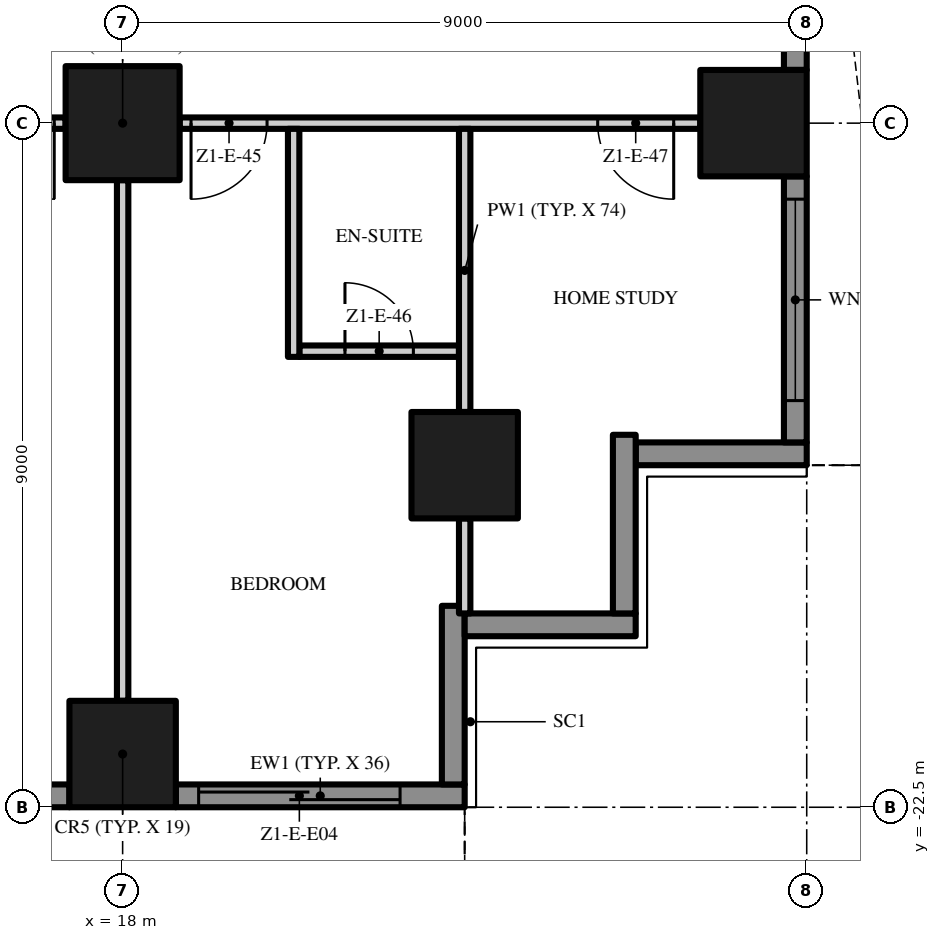
"""IFC4 building model, lengths in metres.
Left out: names, types, materials, properties, quantities, classifications, styles, units other than length and angle.
Written with IfcOpenShell. Run it as: python <this file> out.ifc"""

import sys

from ifc_helpers import new_model, si_unit, direction, frame, frame_2d, origin, origin_2d, place, context, subcontext, project, spatial, polyline, rectangle, outline, extrude, element, fill, save


model = new_model("IFC4")
c1 = context("Model", 3, precision=1e-05, world=origin(), true_north=direction((0.0, 1.0)))
c2 = subcontext(c1, "Body", "Model", "MODEL_VIEW")
j1 = project(units=[si_unit("LENGTHUNIT", "METRE"), si_unit("PLANEANGLEUNIT", "RADIAN")], contexts=[c1])
p1 = place(None, origin())
s1 = spatial("IfcSite", under=j1, at=p1, CompositionType="ELEMENT")
p2 = place(p1, origin())
s2 = spatial("IfcBuilding", under=s1, at=p2, CompositionType="ELEMENT")
p3 = place(p2, frame((0.0, 0.0, 56.8)))
s3 = spatial("IfcBuildingStorey", under=s2, at=p3, CompositionType="ELEMENT", Elevation=56.8)
p4 = place(p3, frame((18.0, -13.5, 0.0), z_axis=(0.0, 0.0, 1.0), x_axis=(1.0, 0.0, 0.0)))
e1 = element("IfcColumn", 1, at=p4, inside=s3, PredefinedType="COLUMN", context=c2, shape_type="SweptSolid", body=[
    extrude(rectangle(XDim=1.5, YDim=1.5, at=origin_2d()), origin(), (0.0, 0.0, 1.0), 3.5),
])
for number, where, z_axis, x_axis in (
    (2, (18.0, -21.8, 0.0), (0.0, 0.0, 1.0), (1.0, 0.0, 0.0)),
    (3, (26.3, -13.5, 0.0), (0.0, 0.0, 1.0), (1.0, 0.0, 0.0)),
    (4, (22.5, -18.0, 0.0), (0.0, 0.0, 1.0), (1.0, 0.0, 0.0)),
):
    element("IfcColumn", number, at=place(p3, frame(where, z_axis=z_axis, x_axis=x_axis)), inside=s3, PredefinedType="COLUMN", context=c2, shape_type="SweptSolid", body=[
        extrude(rectangle(XDim=1.4, YDim=1.4, at=origin_2d()), origin(), (0.0, 0.0, 1.0), 3.5),
    ])
p5 = place(p3, frame((17.3, -22.35, 0.0), z_axis=(0.0, 0.0, 1.0), x_axis=(-1.0, 0.0, 0.0)))
e5 = element("IfcWall", 5, at=p5, inside=s3, PredefinedType="SOLIDWALL", context=c2, shape_type="SweptSolid", body=[
    extrude(rectangle(XDim=7.6, YDim=0.3, at=frame_2d((3.8, 0.0))), origin(), (0.0, 0.0, 1.0), 3.5),
])
p6 = place(p5, frame((4.65, 0.0, 0.45)))
e6 = element("IfcOpeningElement", 6, at=p6, cuts=e5, PredefinedType="OPENING", context=c2, shape_type="SweptSolid", body=[
    extrude(rectangle(XDim=2.65, YDim=2.65, at=frame_2d((1.325, 1.325))), frame((0.0, 0.16, 0.0), z_axis=(0.0, -1.0, 0.0), x_axis=(1.0, 0.0, 0.0)), (0.0, 0.0, 1.0), 0.32),
])
p7 = place(p5, frame((0.3, 0.0, 0.45)))
e7 = element("IfcOpeningElement", 7, at=p7, cuts=e5, PredefinedType="OPENING", context=c2, shape_type="SweptSolid", body=[
    extrude(rectangle(XDim=2.65, YDim=2.65, at=frame_2d((1.325, 1.325))), frame((0.0, 0.16, 0.0), z_axis=(0.0, -1.0, 0.0), x_axis=(1.0, 0.0, 0.0)), (0.0, 0.0, 1.0), 0.32),
])
p8 = place(p3, frame((22.5, -22.35, 0.0), z_axis=(0.0, 0.0, 1.0), x_axis=(-1.0, 0.0, 0.0)))
e8 = element("IfcWall", 8, at=p8, inside=s3, PredefinedType="SOLIDWALL", context=c2, shape_type="SweptSolid", body=[
    extrude(rectangle(XDim=3.8, YDim=0.3, at=frame_2d((1.9, 0.0))), origin(), (0.0, 0.0, 1.0), 3.5),
])
p9 = place(p8, frame((0.85, 0.0, 0.0)))
e9 = element("IfcOpeningElement", 9, at=p9, cuts=e8, PredefinedType="OPENING", context=c2, shape_type="SweptSolid", body=[
    extrude(rectangle(XDim=2.65, YDim=2.4, at=frame_2d((1.325, 1.2))), frame((0.0, 0.16, 0.0), z_axis=(0.0, -1.0, 0.0), x_axis=(1.0, 0.0, 0.0)), (0.0, 0.0, 1.0), 0.32),
])
p10 = place(p3, frame((22.35, -19.85, 0.0), z_axis=(0.0, 0.0, 1.0), x_axis=(0.0, -1.0, 0.0)))
e10 = element("IfcWall", 10, at=p10, inside=s3, PredefinedType="SOLIDWALL", context=c2, shape_type="SweptSolid", body=[
    extrude(rectangle(XDim=2.35, YDim=0.3, at=frame_2d((1.175, 0.0))), origin(), (0.0, 0.0, 1.0), 3.5),
])
p11 = place(p3, frame((24.75, -20.1, 0.0), z_axis=(0.0, 0.0, 1.0), x_axis=(-1.0, 0.0, 0.0)))
e11 = element("IfcWall", 11, at=p11, inside=s3, PredefinedType="SOLIDWALL", context=c2, shape_type="SweptSolid", body=[
    extrude(rectangle(XDim=2.25, YDim=0.3, at=frame_2d((1.125, 0.0))), origin(), (0.0, 0.0, 1.0), 3.5),
])
p12 = place(p3, frame((24.6, -17.6, 0.0), z_axis=(0.0, 0.0, 1.0), x_axis=(0.0, -1.0, 0.0)))
e12 = element("IfcWall", 12, at=p12, inside=s3, PredefinedType="SOLIDWALL", context=c2, shape_type="SweptSolid", body=[
    extrude(rectangle(XDim=2.35, YDim=0.3, at=frame_2d((1.175, 0.0))), origin(), (0.0, 0.0, 1.0), 3.5),
])
p13 = place(p3, frame((27.0, -17.85, 0.0), z_axis=(0.0, 0.0, 1.0), x_axis=(-1.0, 0.0, 0.0)))
e13 = element("IfcWall", 13, at=p13, inside=s3, PredefinedType="SOLIDWALL", context=c2, shape_type="SweptSolid", body=[
    extrude(rectangle(XDim=2.25, YDim=0.3, at=frame_2d((1.125, 0.0))), origin(), (0.0, 0.0, 1.0), 3.5),
])
p14 = place(p3, frame((26.85, -14.2, 0.0), z_axis=(0.0, 0.0, 1.0), x_axis=(0.0, -1.0, 0.0)))
e14 = element("IfcWall", 14, at=p14, inside=s3, PredefinedType="SOLIDWALL", context=c2, shape_type="SweptSolid", body=[
    extrude(rectangle(XDim=3.5, YDim=0.3, at=frame_2d((1.75, 0.0))), origin(), (0.0, 0.0, 1.0), 3.5),
])
p15 = place(p14, frame((0.3, 0.0, 0.45)))
e15 = element("IfcOpeningElement", 15, at=p15, cuts=e14, PredefinedType="OPENING", context=c2, shape_type="SweptSolid", body=[
    extrude(rectangle(XDim=2.65, YDim=2.65, at=frame_2d((1.325, 1.325))), frame((0.0, 0.16, 0.0), z_axis=(0.0, -1.0, 0.0), x_axis=(1.0, 0.0, 0.0)), (0.0, 0.0, 1.0), 0.32),
])
p16 = place(p3, frame((26.85, -5.2, 0.0), z_axis=(0.0, 0.0, 1.0), x_axis=(0.0, -1.0, 0.0)))
e16 = element("IfcWall", 16, at=p16, inside=s3, PredefinedType="SOLIDWALL", context=c2, shape_type="SweptSolid", body=[
    extrude(rectangle(XDim=7.6, YDim=0.3, at=frame_2d((3.8, 0.0))), origin(), (0.0, 0.0, 1.0), 3.5),
])
p17 = place(p16, frame((4.65, 0.0, 0.45)))
e17 = element("IfcOpeningElement", 17, at=p17, cuts=e16, PredefinedType="OPENING", context=c2, shape_type="SweptSolid", body=[
    extrude(rectangle(XDim=2.65, YDim=2.65, at=frame_2d((1.325, 1.325))), frame((0.0, 0.16, 0.0), z_axis=(0.0, -1.0, 0.0), x_axis=(1.0, 0.0, 0.0)), (0.0, 0.0, 1.0), 0.32),
])
p18 = place(p16, frame((0.3, 0.0, 0.0)))
e18 = element("IfcOpeningElement", 18, at=p18, cuts=e16, PredefinedType="OPENING", context=c2, shape_type="SweptSolid", body=[
    extrude(rectangle(XDim=2.65, YDim=2.4, at=frame_2d((1.325, 1.2))), frame((0.0, 0.16, 0.0), z_axis=(0.0, -1.0, 0.0), x_axis=(1.0, 0.0, 0.0)), (0.0, 0.0, 1.0), 0.32),
])
p19 = place(p3, origin())
e19 = element("IfcWall", 19, at=p19, inside=s3, PredefinedType="USERDEFINED", context=c2, shape_type="SweptSolid", body=[
    extrude(outline(polyline([(-22.5, -25.149), (-21.0, -24.488), (-19.5, -23.755), (-18.0, -23.231), (-16.875, -23.1), (-16.5, -23.115), (-15.0, -23.451), (-13.5, -24.112), (-12.0, -24.845), (-10.5, -25.369), (-9.375, -25.5), (-9.0, -25.485), (-7.5, -25.149), (-6.0, -24.488), (-4.5, -23.755), (-3.0, -23.231), (-1.875, -23.1), (-1.5, -23.115), (0.0, -23.451), (1.5, -24.112), (3.0, -24.845), (4.5, -25.369), (5.625, -25.5), (6.0, -25.485), (7.5, -25.149), (9.0, -24.488), (10.5, -23.755), (12.0, -23.231), (13.125, -23.1), (13.5, -23.115), (15.0, -23.451), (16.5, -24.112), (18.0, -24.845), (19.5, -25.369), (20.625, -25.5), (21.0, -25.485), (22.5, -25.149), (22.445, -24.905), (20.967, -25.236), (20.635, -25.249), (19.556, -25.124), (18.096, -24.614), (16.605, -23.885), (15.079, -23.213), (13.533, -22.866), (13.115, -22.849), (11.944, -22.986), (10.404, -23.524), (8.895, -24.261), (7.421, -24.91), (5.967, -25.236), (5.635, -25.249), (4.556, -25.124), (3.096, -24.614), (1.605, -23.885), (0.079, -23.213), (-1.467, -22.866), (-1.885, -22.849), (-3.056, -22.986), (-4.596, -23.524), (-6.105, -24.261), (-7.579, -24.91), (-9.033, -25.236), (-9.365, -25.249), (-10.444, -25.124), (-11.904, -24.614), (-13.395, -23.885), (-14.921, -23.213), (-16.467, -22.866), (-16.885, -22.849), (-18.056, -22.986), (-19.596, -23.524), (-21.105, -24.261), (-22.601, -24.92), (-22.5, -25.149)])), origin(), (0.0, 0.0, 1.0), 0.9),
])
p20 = place(p3, origin())
e20 = element("IfcWall", 20, at=p20, inside=s3, PredefinedType="USERDEFINED", context=c2, shape_type="SweptSolid", body=[
    extrude(outline(polyline([(29.649, -18.0), (28.988, -16.5), (28.255, -15.0), (27.731, -13.5), (27.6, -12.375), (27.615, -12.0), (27.951, -10.5), (28.612, -9.0), (29.345, -7.5), (29.869, -6.0), (30.0, -4.875), (29.985, -4.5), (29.649, -3.0), (28.988, -1.5), (28.255, 0.0), (27.731, 1.5), (27.6, 2.625), (27.615, 3.0), (27.951, 4.5), (28.612, 6.0), (29.345, 7.5), (29.869, 9.0), (30.0, 10.125), (29.985, 10.5), (29.649, 12.0), (28.988, 13.5), (28.255, 15.0), (27.731, 16.5), (27.6, 17.625), (27.615, 18.0), (27.365, 18.01), (27.349, 17.615), (27.486, 16.444), (28.024, 14.904), (28.761, 13.395), (29.41, 11.921), (29.736, 10.467), (29.749, 10.135), (29.624, 9.056), (29.114, 7.596), (28.385, 6.105), (27.713, 4.579), (27.366, 3.033), (27.349, 2.615), (27.486, 1.444), (28.024, -0.096), (28.761, -1.605), (29.41, -3.079), (29.736, -4.533), (29.749, -4.865), (29.624, -5.944), (29.114, -7.404), (28.385, -8.895), (27.713, -10.421), (27.366, -11.967), (27.349, -12.385), (27.486, -13.556), (28.024, -15.096), (28.761, -16.605), (29.42, -18.101), (29.649, -18.0)])), origin(), (0.0, 0.0, 1.0), 0.9),
])
p21 = place(p3, frame((20.325, -16.5, 0.0), z_axis=(0.0, 0.0, 1.0), x_axis=(1.0, 0.0, 0.0)))
e21 = element("IfcWall", 21, at=p21, inside=s3, PredefinedType="PARTITIONING", context=c2, shape_type="SweptSolid", body=[
    extrude(rectangle(XDim=2.1, YDim=0.15, at=frame_2d((1.05, 0.0))), origin(), (0.0, 0.0, 1.0), 3.5),
])
p22 = place(p21, frame((0.6, 0.0, 0.0)))
e22 = element("IfcOpeningElement", 22, at=p22, cuts=e21, PredefinedType="OPENING", context=c2, shape_type="SweptSolid", body=[
    extrude(rectangle(XDim=0.9, YDim=2.1, at=frame_2d((0.45, 1.05))), frame((0.0, 0.085, 0.0), z_axis=(0.0, -1.0, 0.0), x_axis=(1.0, 0.0, 0.0)), (0.0, 0.0, 1.0), 0.17),
])
p23 = place(p3, frame((17.25, -13.5, 0.0), z_axis=(0.0, 0.0, 1.0), x_axis=(-1.0, 0.0, 0.0)))
e23 = element("IfcWall", 23, at=p23, inside=s3, PredefinedType="PARTITIONING", context=c2, shape_type="SweptSolid", body=[
    extrude(rectangle(XDim=7.5, YDim=0.15, at=frame_2d((3.75, 0.0))), origin(), (0.0, 0.0, 1.0), 3.5),
])
p24 = place(p23, frame((5.55, 0.0, 0.0)))
e24 = element("IfcOpeningElement", 24, at=p24, cuts=e23, PredefinedType="OPENING", context=c2, shape_type="SweptSolid", body=[
    extrude(rectangle(XDim=1.8, YDim=2.4, at=frame_2d((0.9, 1.2))), frame((0.0, 0.085, 0.0), z_axis=(0.0, -1.0, 0.0), x_axis=(1.0, 0.0, 0.0)), (0.0, 0.0, 1.0), 0.17),
])
p25 = place(p23, frame((0.15, 0.0, 0.0)))
e25 = element("IfcOpeningElement", 25, at=p25, cuts=e23, PredefinedType="OPENING", context=c2, shape_type="SweptSolid", body=[
    extrude(rectangle(XDim=1.0, YDim=2.4, at=frame_2d((0.5, 1.2))), frame((0.0, 0.085, 0.0), z_axis=(0.0, -1.0, 0.0), x_axis=(1.0, 0.0, 0.0)), (0.0, 0.0, 1.0), 0.17),
])
p26 = place(p3, frame((25.6, -13.5, 0.0), z_axis=(0.0, 0.0, 1.0), x_axis=(-1.0, 0.0, 0.0)))
e26 = element("IfcWall", 26, at=p26, inside=s3, PredefinedType="PARTITIONING", context=c2, shape_type="SweptSolid", body=[
    extrude(rectangle(XDim=6.85, YDim=0.15, at=frame_2d((3.425, 0.0))), origin(), (0.0, 0.0, 1.0), 3.5),
])
p27 = place(p26, frame((5.7, 0.0, 0.0)))
e27 = element("IfcOpeningElement", 27, at=p27, cuts=e26, PredefinedType="OPENING", context=c2, shape_type="SweptSolid", body=[
    extrude(rectangle(XDim=1.0, YDim=2.4, at=frame_2d((0.5, 1.2))), frame((0.0, 0.085, 0.0), z_axis=(0.0, -1.0, 0.0), x_axis=(1.0, 0.0, 0.0)), (0.0, 0.0, 1.0), 0.17),
])
p28 = place(p26, frame((0.35, 0.0, 0.0)))
e28 = element("IfcOpeningElement", 28, at=p28, cuts=e26, PredefinedType="OPENING", context=c2, shape_type="SweptSolid", body=[
    extrude(rectangle(XDim=1.0, YDim=2.4, at=frame_2d((0.5, 1.2))), frame((0.0, 0.085, 0.0), z_axis=(0.0, -1.0, 0.0), x_axis=(1.0, 0.0, 0.0)), (0.0, 0.0, 1.0), 0.17),
])
p29 = place(p3, frame((18.0, -21.1, 0.0), z_axis=(0.0, 0.0, 1.0), x_axis=(0.0, 1.0, 0.0)))
e29 = element("IfcWall", 29, at=p29, inside=s3, PredefinedType="PARTITIONING", context=c2, shape_type="SweptSolid", body=[
    extrude(rectangle(XDim=6.85, YDim=0.15, at=frame_2d((3.425, 0.0))), origin(), (0.0, 0.0, 1.0), 3.5),
])
p30 = place(p3, frame((20.25, -16.575, 0.0), z_axis=(0.0, 0.0, 1.0), x_axis=(0.0, 1.0, 0.0)))
e30 = element("IfcWall", 30, at=p30, inside=s3, PredefinedType="PARTITIONING", context=c2, shape_type="SweptSolid", body=[
    extrude(rectangle(XDim=3.0, YDim=0.15, at=frame_2d((1.5, 0.0))), origin(), (0.0, 0.0, 1.0), 3.5),
])
p31 = place(p3, frame((22.5, -19.95, 0.0), z_axis=(0.0, 0.0, 1.0), x_axis=(0.0, 1.0, 0.0)))
e31 = element("IfcWall", 31, at=p31, inside=s3, PredefinedType="PARTITIONING", context=c2, shape_type="SweptSolid", body=[
    extrude(rectangle(XDim=1.25, YDim=0.15, at=frame_2d((0.625, 0.0))), origin(), (0.0, 0.0, 1.0), 3.5),
])
p32 = place(p3, frame((22.5, -17.3, 0.0), z_axis=(0.0, 0.0, 1.0), x_axis=(0.0, 1.0, 0.0)))
e32 = element("IfcWall", 32, at=p32, inside=s3, PredefinedType="PARTITIONING", context=c2, shape_type="SweptSolid", body=[
    extrude(rectangle(XDim=3.725, YDim=0.15, at=frame_2d((1.863, 0.0))), origin(), (0.0, 0.0, 1.0), 3.5),
])
p33 = place(p9, origin())
e33 = element("IfcDoor", 33, at=p33, inside=s3, OperationType="SINGLE_SWING_LEFT", PredefinedType="DOOR", context=c2, shape_type="SweptSolid", body=[
    extrude(rectangle(XDim=2.65, YDim=2.4, at=frame_2d((1.325, 1.2))), frame((0.0, 0.025, 0.0), z_axis=(0.0, -1.0, 0.0), x_axis=(1.0, 0.0, 0.0)), (0.0, 0.0, 1.0), 0.05),
])
fill(e9, e33)
p34 = place(p15, origin())
e34 = element("IfcWindow", 34, at=p34, inside=s3, PartitioningType="SINGLE_PANEL", PredefinedType="WINDOW", context=c2, shape_type="SweptSolid", body=[
    extrude(rectangle(XDim=2.65, YDim=2.65, at=frame_2d((1.325, 1.325))), frame((0.0, 0.03, 0.0), z_axis=(0.0, -1.0, 0.0), x_axis=(1.0, 0.0, 0.0)), (0.0, 0.0, 1.0), 0.06),
])
fill(e15, e34)
p35 = place(p25, origin())
e35 = element("IfcDoor", 35, at=p35, inside=s3, OperationType="SINGLE_SWING_LEFT", PredefinedType="DOOR", context=c2, shape_type="SweptSolid", body=[
    extrude(rectangle(XDim=1.0, YDim=2.4, at=frame_2d((0.5, 1.2))), frame((0.0, 0.025, 0.0), z_axis=(0.0, -1.0, 0.0), x_axis=(1.0, 0.0, 0.0)), (0.0, 0.0, 1.0), 0.05),
])
fill(e25, e35)
p36 = place(p27, origin())
e36 = element("IfcDoor", 36, at=p36, inside=s3, OperationType="SINGLE_SWING_RIGHT", PredefinedType="DOOR", context=c2, shape_type="SweptSolid", body=[
    extrude(rectangle(XDim=1.0, YDim=2.4, at=frame_2d((0.5, 1.2))), frame((0.0, 0.025, 0.0), z_axis=(0.0, -1.0, 0.0), x_axis=(1.0, 0.0, 0.0)), (0.0, 0.0, 1.0), 0.05),
])
fill(e27, e36)
p37 = place(p22, origin())
e37 = element("IfcDoor", 37, at=p37, inside=s3, OperationType="SINGLE_SWING_LEFT", PredefinedType="DOOR", context=c2, shape_type="SweptSolid", body=[
    extrude(rectangle(XDim=0.9, YDim=2.1, at=frame_2d((0.45, 1.05))), frame((0.0, 0.025, 0.0), z_axis=(0.0, -1.0, 0.0), x_axis=(1.0, 0.0, 0.0)), (0.0, 0.0, 1.0), 0.05),
])
fill(e22, e37)
p38 = place(p28, origin())
e38 = element("IfcDoor", 38, at=p38, inside=s3, OperationType="SINGLE_SWING_LEFT", PredefinedType="DOOR", context=c2, shape_type="SweptSolid", body=[
    extrude(rectangle(XDim=1.0, YDim=2.4, at=frame_2d((0.5, 1.2))), frame((0.0, 0.025, 0.0), z_axis=(0.0, -1.0, 0.0), x_axis=(1.0, 0.0, 0.0)), (0.0, 0.0, 1.0), 0.05),
])
fill(e28, e38)
save(model, sys.argv[1])
